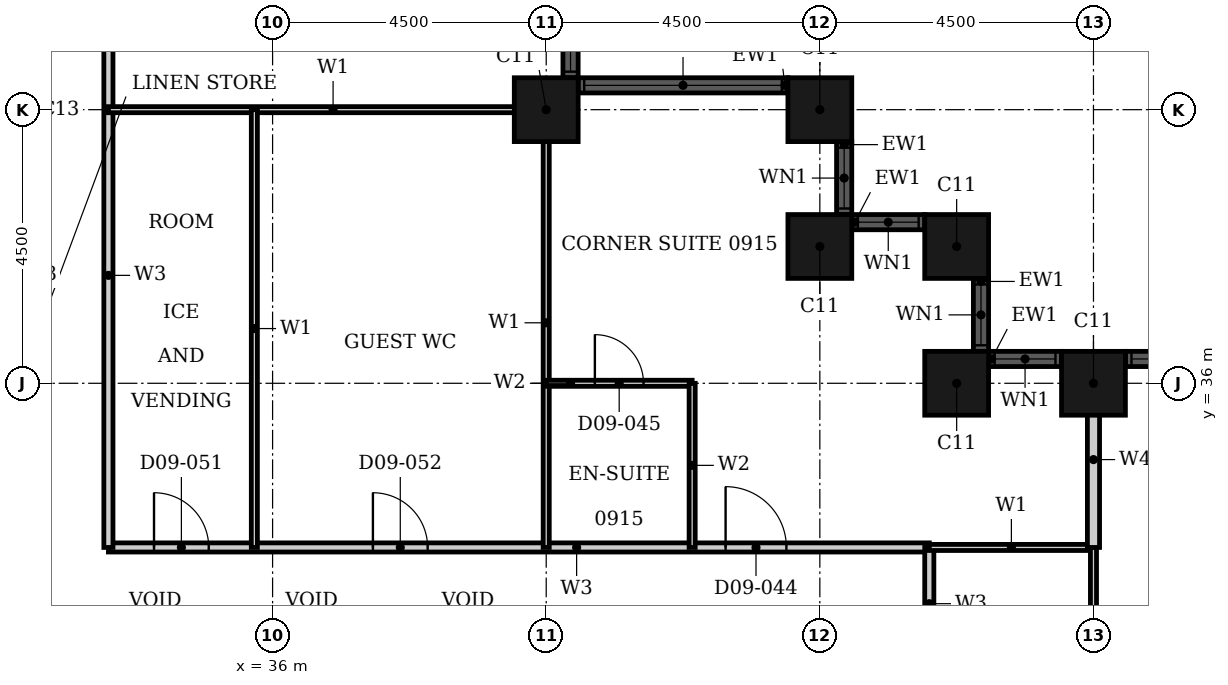
"""IFC4 building model, lengths in metres.
Left out: names, types, materials, properties, quantities, classifications, styles, units other than length and angle.
Written with IfcOpenShell. Run it as: python <this file> out.ifc"""

import sys

from ifc_helpers import new_model, si_unit, direction, frame, frame_2d, origin, origin_2d, place, context, subcontext, project, spatial, rectangle, hollow_rectangle, extrude, element, fill, save


model = new_model("IFC4")
c1 = context("Model", 3, precision=1e-05, world=origin(), true_north=direction((0.0, 1.0)))
c2 = subcontext(c1, "Body", "Model", "MODEL_VIEW")
j1 = project(units=[si_unit("LENGTHUNIT", "METRE"), si_unit("PLANEANGLEUNIT", "RADIAN")], contexts=[c1])
p1 = place(None, origin())
s1 = spatial("IfcSite", under=j1, at=p1, CompositionType="ELEMENT")
p2 = place(p1, origin())
s2 = spatial("IfcBuilding", under=s1, at=p2, CompositionType="ELEMENT")
p3 = place(p2, frame((0.0, 0.0, 44.4)))
s3 = spatial("IfcBuildingStorey", under=s2, at=p3, CompositionType="ELEMENT", Elevation=44.4)
for number, where, z_axis, x_axis in (
    (1, (49.5, 36.0, 0.0), (0.0, 0.0, 1.0), (1.0, 0.0, 0.0)),
    (2, (47.25, 36.0, 0.0), (0.0, 0.0, 1.0), (1.0, 0.0, 0.0)),
    (3, (47.25, 38.25, 0.0), (0.0, 0.0, 1.0), (1.0, 0.0, 0.0)),
    (4, (45.0, 38.25, 0.0), (0.0, 0.0, 1.0), (1.0, 0.0, 0.0)),
    (5, (45.0, 40.5, 0.0), (0.0, 0.0, 1.0), (1.0, 0.0, 0.0)),
    (6, (40.5, 40.5, 0.0), (0.0, 0.0, 1.0), (1.0, 0.0, 0.0)),
):
    element("IfcColumn", number, at=place(p3, frame(where, z_axis=z_axis, x_axis=x_axis)), inside=s3, PredefinedType="COLUMN", context=c2, shape_type="SweptSolid", body=[
        extrude(hollow_rectangle(XDim=1.05, YDim=1.05, WallThickness=0.034, at=origin_2d()), origin(), (0.0, 0.0, 1.0), 3.6),
    ])
p4 = place(p3, frame((57.975, 36.4, 0.0), z_axis=(0.0, 0.0, 1.0), x_axis=(-1.0, 0.0, 0.0)))
e7 = element("IfcWall", 7, at=p4, inside=s3, PredefinedType="SOLIDWALL", context=c2, shape_type="SweptSolid", body=[
    extrude(rectangle(XDim=7.95, YDim=0.25, at=frame_2d((3.975, 0.0))), origin(), (0.0, 0.0, 1.0), 3.6),
])
p5 = place(p4, frame((0.1, 0.0, 0.9)))
e8 = element("IfcOpeningElement", 8, at=p5, cuts=e7, PredefinedType="OPENING", context=c2, shape_type="SweptSolid", body=[
    extrude(rectangle(XDim=3.25, YDim=2.08, at=frame_2d((1.625, 1.04))), frame((0.0, 0.135, 0.0), z_axis=(0.0, -1.0, 0.0), x_axis=(1.0, 0.0, 0.0)), (0.0, 0.0, 1.0), 0.27),
])
p6 = place(p4, frame((4.6, 0.0, 0.9)))
e9 = element("IfcOpeningElement", 9, at=p6, cuts=e7, PredefinedType="OPENING", context=c2, shape_type="SweptSolid", body=[
    extrude(rectangle(XDim=3.25, YDim=2.08, at=frame_2d((1.625, 1.04))), frame((0.0, 0.135, 0.0), z_axis=(0.0, -1.0, 0.0), x_axis=(1.0, 0.0, 0.0)), (0.0, 0.0, 1.0), 0.27),
])
p7 = place(p3, frame((48.975, 36.4, 0.0), z_axis=(0.0, 0.0, 1.0), x_axis=(-1.0, 0.0, 0.0)))
e10 = element("IfcWall", 10, at=p7, inside=s3, PredefinedType="SOLIDWALL", context=c2, shape_type="SweptSolid", body=[
    extrude(rectangle(XDim=1.2, YDim=0.25, at=frame_2d((0.6, 0.0))), origin(), (0.0, 0.0, 1.0), 3.6),
])
p8 = place(p7, frame((0.1, 0.0, 0.9)))
e11 = element("IfcOpeningElement", 11, at=p8, cuts=e10, PredefinedType="OPENING", context=c2, shape_type="SweptSolid", body=[
    extrude(rectangle(XDim=1.0, YDim=2.08, at=frame_2d((0.5, 1.04))), frame((0.0, 0.135, 0.0), z_axis=(0.0, -1.0, 0.0), x_axis=(1.0, 0.0, 0.0)), (0.0, 0.0, 1.0), 0.27),
])
p9 = place(p3, frame((47.65, 36.525, 0.0), z_axis=(0.0, 0.0, 1.0), x_axis=(0.0, 1.0, 0.0)))
e12 = element("IfcWall", 12, at=p9, inside=s3, PredefinedType="SOLIDWALL", context=c2, shape_type="SweptSolid", body=[
    extrude(rectangle(XDim=1.2, YDim=0.25, at=frame_2d((0.6, 0.0))), origin(), (0.0, 0.0, 1.0), 3.6),
])
p10 = place(p9, frame((0.1, 0.0, 0.9)))
e13 = element("IfcOpeningElement", 13, at=p10, cuts=e12, PredefinedType="OPENING", context=c2, shape_type="SweptSolid", body=[
    extrude(rectangle(XDim=1.0, YDim=2.08, at=frame_2d((0.5, 1.04))), frame((0.0, 0.135, 0.0), z_axis=(0.0, -1.0, 0.0), x_axis=(1.0, 0.0, 0.0)), (0.0, 0.0, 1.0), 0.27),
])
p11 = place(p3, frame((46.725, 38.65, 0.0), z_axis=(0.0, 0.0, 1.0), x_axis=(-1.0, 0.0, 0.0)))
e14 = element("IfcWall", 14, at=p11, inside=s3, PredefinedType="SOLIDWALL", context=c2, shape_type="SweptSolid", body=[
    extrude(rectangle(XDim=1.2, YDim=0.25, at=frame_2d((0.6, 0.0))), origin(), (0.0, 0.0, 1.0), 3.6),
])
p12 = place(p11, frame((0.1, 0.0, 0.9)))
e15 = element("IfcOpeningElement", 15, at=p12, cuts=e14, PredefinedType="OPENING", context=c2, shape_type="SweptSolid", body=[
    extrude(rectangle(XDim=1.0, YDim=2.08, at=frame_2d((0.5, 1.04))), frame((0.0, 0.135, 0.0), z_axis=(0.0, -1.0, 0.0), x_axis=(1.0, 0.0, 0.0)), (0.0, 0.0, 1.0), 0.27),
])
p13 = place(p3, frame((45.4, 38.775, 0.0), z_axis=(0.0, 0.0, 1.0), x_axis=(0.0, 1.0, 0.0)))
e16 = element("IfcWall", 16, at=p13, inside=s3, PredefinedType="SOLIDWALL", context=c2, shape_type="SweptSolid", body=[
    extrude(rectangle(XDim=1.2, YDim=0.25, at=frame_2d((0.6, 0.0))), origin(), (0.0, 0.0, 1.0), 3.6),
])
p14 = place(p13, frame((0.1, 0.0, 0.9)))
e17 = element("IfcOpeningElement", 17, at=p14, cuts=e16, PredefinedType="OPENING", context=c2, shape_type="SweptSolid", body=[
    extrude(rectangle(XDim=1.0, YDim=2.08, at=frame_2d((0.5, 1.04))), frame((0.0, 0.135, 0.0), z_axis=(0.0, -1.0, 0.0), x_axis=(1.0, 0.0, 0.0)), (0.0, 0.0, 1.0), 0.27),
])
p15 = place(p3, frame((44.475, 40.9, 0.0), z_axis=(0.0, 0.0, 1.0), x_axis=(-1.0, 0.0, 0.0)))
e18 = element("IfcWall", 18, at=p15, inside=s3, PredefinedType="SOLIDWALL", context=c2, shape_type="SweptSolid", body=[
    extrude(rectangle(XDim=3.45, YDim=0.25, at=frame_2d((1.725, 0.0))), origin(), (0.0, 0.0, 1.0), 3.6),
])
p16 = place(p15, frame((0.1, 0.0, 0.9)))
e19 = element("IfcOpeningElement", 19, at=p16, cuts=e18, PredefinedType="OPENING", context=c2, shape_type="SweptSolid", body=[
    extrude(rectangle(XDim=3.25, YDim=2.08, at=frame_2d((1.625, 1.04))), frame((0.0, 0.135, 0.0), z_axis=(0.0, -1.0, 0.0), x_axis=(1.0, 0.0, 0.0)), (0.0, 0.0, 1.0), 0.27),
])
p17 = place(p3, frame((40.9, 41.025, 0.0), z_axis=(0.0, 0.0, 1.0), x_axis=(0.0, 1.0, 0.0)))
e20 = element("IfcWall", 20, at=p17, inside=s3, PredefinedType="SOLIDWALL", context=c2, shape_type="SweptSolid", body=[
    extrude(rectangle(XDim=7.95, YDim=0.25, at=frame_2d((3.975, 0.0))), origin(), (0.0, 0.0, 1.0), 3.6),
])
p18 = place(p17, frame((0.1, 0.0, 0.9)))
e21 = element("IfcOpeningElement", 21, at=p18, cuts=e20, PredefinedType="OPENING", context=c2, shape_type="SweptSolid", body=[
    extrude(rectangle(XDim=3.25, YDim=2.08, at=frame_2d((1.625, 1.04))), frame((0.0, 0.135, 0.0), z_axis=(0.0, -1.0, 0.0), x_axis=(1.0, 0.0, 0.0)), (0.0, 0.0, 1.0), 0.27),
])
p19 = place(p17, frame((4.6, 0.0, 0.9)))
e22 = element("IfcOpeningElement", 22, at=p19, cuts=e20, PredefinedType="OPENING", context=c2, shape_type="SweptSolid", body=[
    extrude(rectangle(XDim=3.25, YDim=2.08, at=frame_2d((1.625, 1.04))), frame((0.0, 0.135, 0.0), z_axis=(0.0, -1.0, 0.0), x_axis=(1.0, 0.0, 0.0)), (0.0, 0.0, 1.0), 0.27),
])
p20 = place(p3, frame((33.3, 33.3, 0.0), z_axis=(0.0, 0.0, 1.0), x_axis=(1.0, 0.0, 0.0)))
e23 = element("IfcWall", 23, at=p20, inside=s3, PredefinedType="PARTITIONING", context=c2, shape_type="SweptSolid", body=[
    extrude(rectangle(XDim=13.5, YDim=0.15, at=frame_2d((6.75, 0.0))), origin(), (0.0, 0.0, 1.0), 3.2),
])
p21 = place(p20, frame((10.15, 0.0, 0.0)))
e24 = element("IfcOpeningElement", 24, at=p21, cuts=e23, PredefinedType="OPENING", context=c2, shape_type="SweptSolid", body=[
    extrude(rectangle(XDim=1.0, YDim=2.1, at=frame_2d((0.5, 1.05))), frame((0.0, 0.085, 0.0), z_axis=(0.0, -1.0, 0.0), x_axis=(1.0, 0.0, 0.0)), (0.0, 0.0, 1.0), 0.17),
])
p22 = place(p20, frame((0.75, 0.0, 0.0)))
e25 = element("IfcOpeningElement", 25, at=p22, cuts=e23, PredefinedType="OPENING", context=c2, shape_type="SweptSolid", body=[
    extrude(rectangle(XDim=0.9, YDim=2.1, at=frame_2d((0.45, 1.05))), frame((0.0, 0.085, 0.0), z_axis=(0.0, -1.0, 0.0), x_axis=(1.0, 0.0, 0.0)), (0.0, 0.0, 1.0), 0.17),
])
p23 = place(p20, frame((4.35, 0.0, 0.0)))
e26 = element("IfcOpeningElement", 26, at=p23, cuts=e23, PredefinedType="OPENING", context=c2, shape_type="SweptSolid", body=[
    extrude(rectangle(XDim=0.9, YDim=2.1, at=frame_2d((0.45, 1.05))), frame((0.0, 0.085, 0.0), z_axis=(0.0, -1.0, 0.0), x_axis=(1.0, 0.0, 0.0)), (0.0, 0.0, 1.0), 0.17),
])
p24 = place(p3, frame((33.3, 33.3, 0.0), z_axis=(0.0, 0.0, 1.0), x_axis=(0.0, 1.0, 0.0)))
e27 = element("IfcWall", 27, at=p24, inside=s3, PredefinedType="PARTITIONING", context=c2, shape_type="SweptSolid", body=[
    extrude(rectangle(XDim=16.2, YDim=0.15, at=frame_2d((8.1, 0.0))), origin(), (0.0, 0.0, 1.0), 3.2),
])
p25 = place(p24, frame((8.95, 0.0, 0.0)))
e28 = element("IfcOpeningElement", 28, at=p25, cuts=e27, PredefinedType="OPENING", context=c2, shape_type="SweptSolid", body=[
    extrude(rectangle(XDim=1.0, YDim=2.1, at=frame_2d((0.5, 1.05))), frame((0.0, 0.085, 0.0), z_axis=(0.0, -1.0, 0.0), x_axis=(1.0, 0.0, 0.0)), (0.0, 0.0, 1.0), 0.17),
])
p26 = place(p3, frame((46.8, 28.8, 0.0), z_axis=(0.0, 0.0, 1.0), x_axis=(0.0, 1.0, 0.0)))
e29 = element("IfcWall", 29, at=p26, inside=s3, PredefinedType="PARTITIONING", context=c2, shape_type="SweptSolid", body=[
    extrude(rectangle(XDim=4.5, YDim=0.15, at=frame_2d((2.25, 0.0))), origin(), (0.0, 0.0, 1.0), 3.2),
])
p27 = place(p26, frame((1.75, 0.0, 0.0)))
e30 = element("IfcOpeningElement", 30, at=p27, cuts=e29, PredefinedType="OPENING", context=c2, shape_type="SweptSolid", body=[
    extrude(rectangle(XDim=0.9, YDim=2.1, at=frame_2d((0.45, 1.05))), frame((0.0, 0.085, 0.0), z_axis=(0.0, -1.0, 0.0), x_axis=(1.0, 0.0, 0.0)), (0.0, 0.0, 1.0), 0.17),
])
p28 = place(p3, frame((46.8, 33.3, 0.0), z_axis=(0.0, 0.0, 1.0), x_axis=(1.0, 0.0, 0.0)))
e31 = element("IfcWall", 31, at=p28, inside=s3, PredefinedType="PARTITIONING", context=c2, shape_type="SweptSolid", body=[
    extrude(rectangle(XDim=2.7, YDim=0.1, at=frame_2d((1.35, 0.0))), origin(), (0.0, 0.0, 1.0), 3.2),
])
p29 = place(p3, frame((33.3, 40.5, 0.0), z_axis=(0.0, 0.0, 1.0), x_axis=(1.0, 0.0, 0.0)))
e32 = element("IfcWall", 32, at=p29, inside=s3, PredefinedType="PARTITIONING", context=c2, shape_type="SweptSolid", body=[
    extrude(rectangle(XDim=7.39, YDim=0.1, at=frame_2d((3.695, 0.0))), origin(), (0.0, 0.0, 1.0), 2.28),
])
p30 = place(p3, frame((35.7, 33.3, 0.0), z_axis=(0.0, 0.0, 1.0), x_axis=(0.0, 1.0, 0.0)))
e33 = element("IfcWall", 33, at=p30, inside=s3, PredefinedType="PARTITIONING", context=c2, shape_type="SweptSolid", body=[
    extrude(rectangle(XDim=7.2, YDim=0.1, at=frame_2d((3.6, 0.0))), origin(), (0.0, 0.0, 1.0), 3.2),
])
p31 = place(p3, frame((40.5, 33.3, 0.0), z_axis=(0.0, 0.0, 1.0), x_axis=(0.0, 1.0, 0.0)))
e34 = element("IfcWall", 34, at=p31, inside=s3, PredefinedType="PARTITIONING", context=c2, shape_type="SweptSolid", body=[
    extrude(rectangle(XDim=7.39, YDim=0.1, at=frame_2d((3.695, 0.0))), origin(), (0.0, 0.0, 1.0), 3.2),
])
p32 = place(p3, frame((49.5, 28.8, 0.0), z_axis=(0.0, 0.0, 1.0), x_axis=(0.0, 1.0, 0.0)))
e35 = element("IfcWall", 35, at=p32, inside=s3, PredefinedType="PARTITIONING", context=c2, shape_type="SweptSolid", body=[
    extrude(rectangle(XDim=4.5, YDim=0.1, at=frame_2d((2.25, 0.0))), origin(), (0.0, 0.0, 1.0), 2.28),
])
p33 = place(p3, frame((49.5, 33.3, 0.0), z_axis=(0.0, 0.0, 1.0), x_axis=(0.0, 1.0, 0.0)))
e36 = element("IfcWall", 36, at=p33, inside=s3, PredefinedType="PARTITIONING", context=c2, shape_type="SweptSolid", body=[
    extrude(rectangle(XDim=2.89, YDim=0.2, at=frame_2d((1.445, 0.0))), origin(), (0.0, 0.0, 1.0), 2.28),
])
p34 = place(p3, frame((40.5, 36.0, 0.0), z_axis=(0.0, 0.0, 1.0), x_axis=(1.0, 0.0, 0.0)))
e37 = element("IfcWall", 37, at=p34, inside=s3, PredefinedType="PARTITIONING", context=c2, shape_type="SweptSolid", body=[
    extrude(rectangle(XDim=2.4, YDim=0.1, at=frame_2d((1.2, 0.0))), origin(), (0.0, 0.0, 1.0), 3.2),
])
p35 = place(p34, frame((0.8, 0.0, 0.0)))
e38 = element("IfcOpeningElement", 38, at=p35, cuts=e37, PredefinedType="OPENING", context=c2, shape_type="SweptSolid", body=[
    extrude(rectangle(XDim=0.8, YDim=2.1, at=frame_2d((0.4, 1.05))), frame((0.0, 0.06, 0.0), z_axis=(0.0, -1.0, 0.0), x_axis=(1.0, 0.0, 0.0)), (0.0, 0.0, 1.0), 0.12),
])
p36 = place(p3, frame((42.9, 33.3, 0.0), z_axis=(0.0, 0.0, 1.0), x_axis=(0.0, 1.0, 0.0)))
e39 = element("IfcWall", 39, at=p36, inside=s3, PredefinedType="PARTITIONING", context=c2, shape_type="SweptSolid", body=[
    extrude(rectangle(XDim=2.7, YDim=0.1, at=frame_2d((1.35, 0.0))), origin(), (0.0, 0.0, 1.0), 3.2),
])
p37 = place(p6, origin())
e40 = element("IfcWindow", 40, at=p37, inside=s3, PartitioningType="SINGLE_PANEL", PredefinedType="WINDOW", context=c2, shape_type="SweptSolid", body=[
    extrude(rectangle(XDim=3.25, YDim=2.08, at=frame_2d((1.625, 1.04))), frame((0.0, 0.03, 0.0), z_axis=(0.0, -1.0, 0.0), x_axis=(1.0, 0.0, 0.0)), (0.0, 0.0, 1.0), 0.06),
])
fill(e9, e40)
p38 = place(p8, origin())
e41 = element("IfcWindow", 41, at=p38, inside=s3, PartitioningType="SINGLE_PANEL", PredefinedType="WINDOW", context=c2, shape_type="SweptSolid", body=[
    extrude(rectangle(XDim=1.0, YDim=2.08, at=frame_2d((0.5, 1.04))), frame((0.0, 0.03, 0.0), z_axis=(0.0, -1.0, 0.0), x_axis=(1.0, 0.0, 0.0)), (0.0, 0.0, 1.0), 0.06),
])
fill(e11, e41)
p39 = place(p10, origin())
e42 = element("IfcWindow", 42, at=p39, inside=s3, PartitioningType="SINGLE_PANEL", PredefinedType="WINDOW", context=c2, shape_type="SweptSolid", body=[
    extrude(rectangle(XDim=1.0, YDim=2.08, at=frame_2d((0.5, 1.04))), frame((0.0, 0.03, 0.0), z_axis=(0.0, -1.0, 0.0), x_axis=(1.0, 0.0, 0.0)), (0.0, 0.0, 1.0), 0.06),
])
fill(e13, e42)
p40 = place(p12, origin())
e43 = element("IfcWindow", 43, at=p40, inside=s3, PartitioningType="SINGLE_PANEL", PredefinedType="WINDOW", context=c2, shape_type="SweptSolid", body=[
    extrude(rectangle(XDim=1.0, YDim=2.08, at=frame_2d((0.5, 1.04))), frame((0.0, 0.03, 0.0), z_axis=(0.0, -1.0, 0.0), x_axis=(1.0, 0.0, 0.0)), (0.0, 0.0, 1.0), 0.06),
])
fill(e15, e43)
p41 = place(p14, origin())
e44 = element("IfcWindow", 44, at=p41, inside=s3, PartitioningType="SINGLE_PANEL", PredefinedType="WINDOW", context=c2, shape_type="SweptSolid", body=[
    extrude(rectangle(XDim=1.0, YDim=2.08, at=frame_2d((0.5, 1.04))), frame((0.0, 0.03, 0.0), z_axis=(0.0, -1.0, 0.0), x_axis=(1.0, 0.0, 0.0)), (0.0, 0.0, 1.0), 0.06),
])
fill(e17, e44)
p42 = place(p16, origin())
e45 = element("IfcWindow", 45, at=p42, inside=s3, PartitioningType="SINGLE_PANEL", PredefinedType="WINDOW", context=c2, shape_type="SweptSolid", body=[
    extrude(rectangle(XDim=3.25, YDim=2.08, at=frame_2d((1.625, 1.04))), frame((0.0, 0.03, 0.0), z_axis=(0.0, -1.0, 0.0), x_axis=(1.0, 0.0, 0.0)), (0.0, 0.0, 1.0), 0.06),
])
fill(e19, e45)
p43 = place(p18, origin())
e46 = element("IfcWindow", 46, at=p43, inside=s3, PartitioningType="SINGLE_PANEL", PredefinedType="WINDOW", context=c2, shape_type="SweptSolid", body=[
    extrude(rectangle(XDim=3.25, YDim=2.08, at=frame_2d((1.625, 1.04))), frame((0.0, 0.03, 0.0), z_axis=(0.0, -1.0, 0.0), x_axis=(1.0, 0.0, 0.0)), (0.0, 0.0, 1.0), 0.06),
])
fill(e21, e46)
p44 = place(p21, origin())
e47 = element("IfcDoor", 47, at=p44, inside=s3, OperationType="SINGLE_SWING_RIGHT", PredefinedType="DOOR", context=c2, shape_type="SweptSolid", body=[
    extrude(rectangle(XDim=1.0, YDim=2.1, at=frame_2d((0.5, 1.05))), frame((0.0, 0.025, 0.0), z_axis=(0.0, -1.0, 0.0), x_axis=(1.0, 0.0, 0.0)), (0.0, 0.0, 1.0), 0.05),
])
fill(e24, e47)
p45 = place(p35, origin())
e48 = element("IfcDoor", 48, at=p45, inside=s3, OperationType="SINGLE_SWING_LEFT", PredefinedType="DOOR", context=c2, shape_type="SweptSolid", body=[
    extrude(rectangle(XDim=0.8, YDim=2.1, at=frame_2d((0.4, 1.05))), frame((0.0, 0.025, 0.0), z_axis=(0.0, -1.0, 0.0), x_axis=(1.0, 0.0, 0.0)), (0.0, 0.0, 1.0), 0.05),
])
fill(e38, e48)
p46 = place(p22, origin())
e49 = element("IfcDoor", 49, at=p46, inside=s3, OperationType="SINGLE_SWING_RIGHT", PredefinedType="DOOR", context=c2, shape_type="SweptSolid", body=[
    extrude(rectangle(XDim=0.9, YDim=2.1, at=frame_2d((0.45, 1.05))), frame((0.0, 0.025, 0.0), z_axis=(0.0, -1.0, 0.0), x_axis=(1.0, 0.0, 0.0)), (0.0, 0.0, 1.0), 0.05),
])
fill(e25, e49)
p47 = place(p23, origin())
e50 = element("IfcDoor", 50, at=p47, inside=s3, OperationType="SINGLE_SWING_LEFT", PredefinedType="DOOR", context=c2, shape_type="SweptSolid", body=[
    extrude(rectangle(XDim=0.9, YDim=2.1, at=frame_2d((0.45, 1.05))), frame((0.0, 0.025, 0.0), z_axis=(0.0, -1.0, 0.0), x_axis=(1.0, 0.0, 0.0)), (0.0, 0.0, 1.0), 0.05),
])
fill(e26, e50)
save(model, sys.argv[1])
